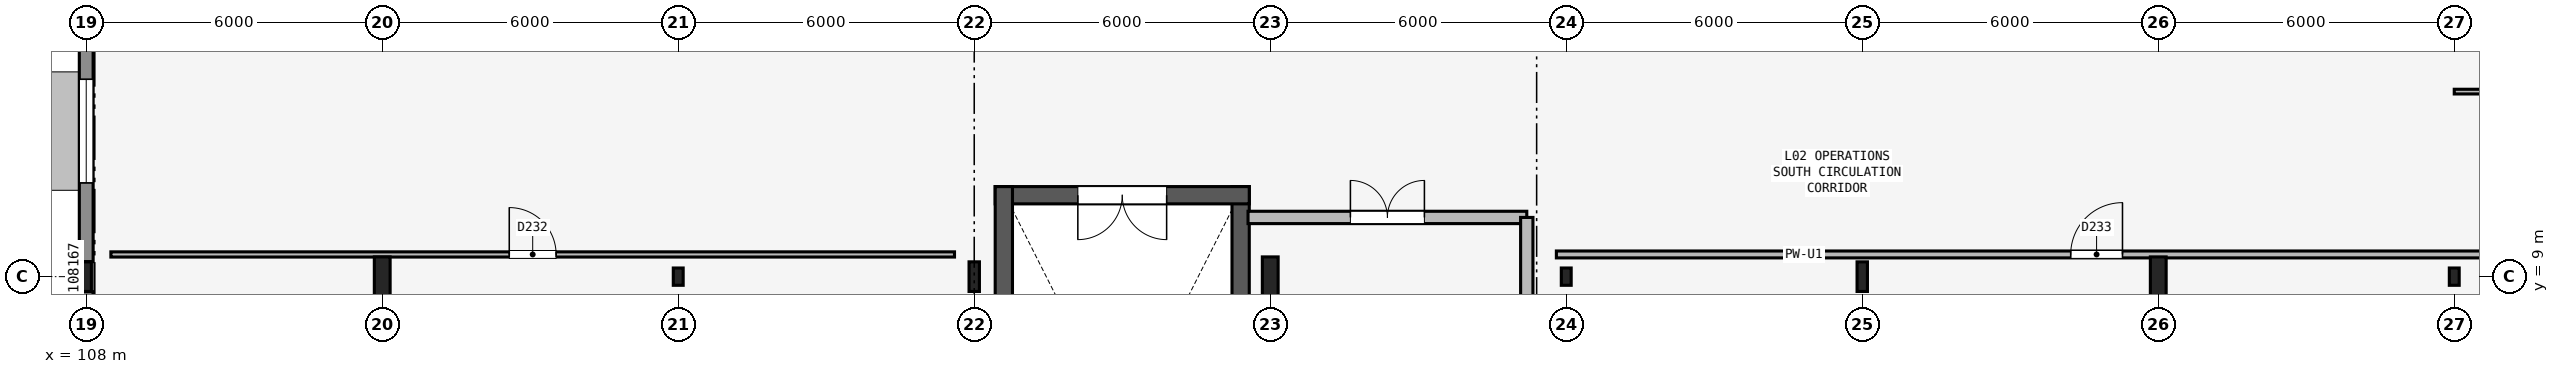
"""IFC4 building model, lengths in metres.
Left out: names, types, materials, properties, quantities, classifications, styles, units other than length and angle.
Written with IfcOpenShell. Run it as: python <this file> out.ifc"""

import sys

from ifc_helpers import new_model, si_unit, direction, frame, frame_2d, origin, origin_2d, place, context, subcontext, project, spatial, rectangle, hollow_rectangle, i_section, extrude, element, fill, save


model = new_model("IFC4")
c1 = context("Model", 3, precision=1e-05, world=origin(), true_north=direction((0.0, 1.0)))
c2 = subcontext(c1, "Body", "Model", "MODEL_VIEW")
j1 = project(units=[si_unit("LENGTHUNIT", "METRE"), si_unit("PLANEANGLEUNIT", "RADIAN")], contexts=[c1])
p1 = place(None, origin())
s1 = spatial("IfcSite", under=j1, at=p1, CompositionType="ELEMENT")
p2 = place(p1, origin())
s2 = spatial("IfcBuilding", under=s1, at=p2, CompositionType="ELEMENT")
p3 = place(p2, frame((0.0, 0.0, 9.3)))
s3 = spatial("IfcBuildingStorey", under=s2, at=p3, CompositionType="ELEMENT", Elevation=9.3)
p4 = place(p3, frame((108.0, 9.0, 0.0), z_axis=(0.0, 0.0, 1.0), x_axis=(1.0, 0.0, 0.0)))
e1 = element("IfcColumn", 1, at=p4, inside=s3, PredefinedType="COLUMN", context=c2, shape_type="SweptSolid", body=[
    extrude(i_section(OverallWidth=0.21, OverallDepth=0.6, WebThickness=0.012, FlangeThickness=0.021, FilletRadius=0.02, at=origin_2d()), origin(), (0.0, 0.0, 1.0), 4.2),
])
p5 = place(p3, frame((114.0, 9.0, 0.0), z_axis=(0.0, 0.0, 1.0), x_axis=(1.0, 0.0, 0.0)))
e2 = element("IfcColumn", 2, at=p5, inside=s3, PredefinedType="COLUMN", context=c2, shape_type="SweptSolid", body=[
    extrude(i_section(OverallWidth=0.32, OverallDepth=0.8, WebThickness=0.016, FlangeThickness=0.028, at=origin_2d()), origin(), (0.0, 0.0, 1.0), 4.2),
])
p6 = place(p3, frame((120.0, 9.0, 0.0), z_axis=(0.0, 0.0, 1.0), x_axis=(1.0, 0.0, 0.0)))
e3 = element("IfcColumn", 3, at=p6, inside=s3, PredefinedType="COLUMN", context=c2, shape_type="SweptSolid", body=[
    extrude(hollow_rectangle(XDim=0.2, YDim=0.35, WallThickness=0.012, InnerFilletRadius=0.012, OuterFilletRadius=0.024, at=origin_2d()), origin(), (0.0, 0.0, 1.0), 4.2),
])
p7 = place(p3, frame((126.0, 9.0, 0.0), z_axis=(0.0, 0.0, 1.0), x_axis=(1.0, 0.0, 0.0)))
e4 = element("IfcColumn", 4, at=p7, inside=s3, PredefinedType="COLUMN", context=c2, shape_type="SweptSolid", body=[
    extrude(i_section(OverallWidth=0.21, OverallDepth=0.6, WebThickness=0.012, FlangeThickness=0.021, FilletRadius=0.02, at=origin_2d()), origin(), (0.0, 0.0, 1.0), 4.2),
])
p8 = place(p3, frame((132.0, 9.0, 0.0), z_axis=(0.0, 0.0, 1.0), x_axis=(1.0, 0.0, 0.0)))
e5 = element("IfcColumn", 5, at=p8, inside=s3, PredefinedType="COLUMN", context=c2, shape_type="SweptSolid", body=[
    extrude(i_section(OverallWidth=0.32, OverallDepth=0.8, WebThickness=0.016, FlangeThickness=0.028, at=origin_2d()), origin(), (0.0, 0.0, 1.0), 4.2),
])
p9 = place(p3, frame((138.0, 9.0, 0.0), z_axis=(0.0, 0.0, 1.0), x_axis=(1.0, 0.0, 0.0)))
e6 = element("IfcColumn", 6, at=p9, inside=s3, PredefinedType="COLUMN", context=c2, shape_type="SweptSolid", body=[
    extrude(hollow_rectangle(XDim=0.2, YDim=0.35, WallThickness=0.012, InnerFilletRadius=0.012, OuterFilletRadius=0.024, at=origin_2d()), origin(), (0.0, 0.0, 1.0), 4.2),
])
p10 = place(p3, frame((144.0, 9.0, 0.0), z_axis=(0.0, 0.0, 1.0), x_axis=(1.0, 0.0, 0.0)))
e7 = element("IfcColumn", 7, at=p10, inside=s3, PredefinedType="COLUMN", context=c2, shape_type="SweptSolid", body=[
    extrude(i_section(OverallWidth=0.21, OverallDepth=0.6, WebThickness=0.012, FlangeThickness=0.021, FilletRadius=0.02, at=origin_2d()), origin(), (0.0, 0.0, 1.0), 4.2),
])
p11 = place(p3, frame((150.0, 9.0, 0.0), z_axis=(0.0, 0.0, 1.0), x_axis=(1.0, 0.0, 0.0)))
e8 = element("IfcColumn", 8, at=p11, inside=s3, PredefinedType="COLUMN", context=c2, shape_type="SweptSolid", body=[
    extrude(i_section(OverallWidth=0.32, OverallDepth=0.8, WebThickness=0.016, FlangeThickness=0.028, at=origin_2d()), origin(), (0.0, 0.0, 1.0), 4.2),
])
p12 = place(p3, frame((156.0, 9.0, 0.0), z_axis=(0.0, 0.0, 1.0), x_axis=(1.0, 0.0, 0.0)))
e9 = element("IfcColumn", 9, at=p12, inside=s3, PredefinedType="COLUMN", context=c2, shape_type="SweptSolid", body=[
    extrude(hollow_rectangle(XDim=0.2, YDim=0.35, WallThickness=0.012, InnerFilletRadius=0.012, OuterFilletRadius=0.024, at=origin_2d()), origin(), (0.0, 0.0, 1.0), 4.2),
])
p13 = place(p3, frame((108.0, 6.8, 0.0), z_axis=(0.0, 0.0, 1.0), x_axis=(0.0, 1.0, 0.0)))
e10 = element("IfcWall", 10, at=p13, inside=s3, PredefinedType="SOLIDWALL", context=c2, shape_type="SweptSolid", body=[
    extrude(rectangle(XDim=1.896, YDim=0.28, at=frame_2d((0.948, 0.0))), origin(), (0.0, 0.0, 1.0), 3.566),
])
p14 = place(p3, frame((108.0, 9.304, 0.0), z_axis=(0.0, 0.0, 1.0), x_axis=(0.0, 1.0, 0.0)))
e11 = element("IfcWall", 11, at=p14, inside=s3, PredefinedType="SOLIDWALL", context=c2, shape_type="SweptSolid", body=[
    extrude(rectangle(XDim=5.292, YDim=0.28, at=frame_2d((2.646, 0.0))), origin(), (0.0, 0.0, 1.0), 3.566),
])
p15 = place(p14, frame((1.596, 0.0, 0.9)))
e12 = element("IfcOpeningElement", 12, at=p15, cuts=e11, PredefinedType="OPENING", context=c2, shape_type="SweptSolid", body=[
    extrude(rectangle(XDim=2.1, YDim=1.5, at=frame_2d((1.05, 0.75))), frame((0.0, 0.15, 0.0), z_axis=(0.0, -1.0, 0.0), x_axis=(1.0, 0.0, 0.0)), (0.0, 0.0, 1.0), 0.3),
])
p16 = place(p3, frame((131.4, 1.075, 0.0), z_axis=(0.0, 0.0, 1.0), x_axis=(0.0, 1.0, 0.0)))
e13 = element("IfcWall", 13, at=p16, inside=s3, PredefinedType="SHEAR", context=c2, shape_type="SweptSolid", body=[
    extrude(rectangle(XDim=9.75, YDim=0.35, at=frame_2d((4.875, 0.0))), origin(), (0.0, 0.0, 1.0), 4.06),
])
p17 = place(p3, frame((131.575, 10.65, 0.0), z_axis=(0.0, 0.0, 1.0), x_axis=(-1.0, 0.0, 0.0)))
e14 = element("IfcWall", 14, at=p17, inside=s3, PredefinedType="SHEAR", context=c2, shape_type="SweptSolid", body=[
    extrude(rectangle(XDim=5.15, YDim=0.35, at=frame_2d((2.575, 0.0))), origin(), (0.0, 0.0, 1.0), 4.06),
])
p18 = place(p17, frame((1.675, 0.0, 0.0)))
e15 = element("IfcOpeningElement", 15, at=p18, cuts=e14, PredefinedType="OPENING", context=c2, shape_type="SweptSolid", body=[
    extrude(rectangle(XDim=1.8, YDim=2.2, at=frame_2d((0.9, 1.1))), frame((0.0, 0.185, 0.0), z_axis=(0.0, -1.0, 0.0), x_axis=(1.0, 0.0, 0.0)), (0.0, 0.0, 1.0), 0.37),
])
p19 = place(p3, frame((126.6, 10.825, 0.0), z_axis=(0.0, 0.0, 1.0), x_axis=(0.0, -1.0, 0.0)))
e16 = element("IfcWall", 16, at=p19, inside=s3, PredefinedType="SHEAR", context=c2, shape_type="SweptSolid", body=[
    extrude(rectangle(XDim=9.75, YDim=0.35, at=frame_2d((4.875, 0.0))), origin(), (0.0, 0.0, 1.0), 4.06),
])
p20 = place(p3, frame((131.55, 10.2, 0.0), z_axis=(0.0, 0.0, 1.0), x_axis=(1.0, 0.0, 0.0)))
e17 = element("IfcWall", 17, at=p20, inside=s3, PredefinedType="PARTITIONING", context=c2, shape_type="SweptSolid", body=[
    extrude(rectangle(XDim=5.65, YDim=0.25, at=frame_2d((2.825, 0.0))), origin(), (0.0, 0.0, 1.0), 3.566),
])
p21 = place(p20, frame((2.075, 0.0, 0.0)))
e18 = element("IfcOpeningElement", 18, at=p21, cuts=e17, PredefinedType="OPENING", context=c2, shape_type="SweptSolid", body=[
    extrude(rectangle(XDim=1.5, YDim=2.15, at=frame_2d((0.75, 1.075))), frame((0.0, 0.135, 0.0), z_axis=(0.0, -1.0, 0.0), x_axis=(1.0, 0.0, 0.0)), (0.0, 0.0, 1.0), 0.27),
])
p22 = place(p3, frame((137.2, 5.8, 0.0), z_axis=(0.0, 0.0, 1.0), x_axis=(0.0, 1.0, 0.0)))
e19 = element("IfcWall", 19, at=p22, inside=s3, PredefinedType="PARTITIONING", context=c2, shape_type="SweptSolid", body=[
    extrude(rectangle(XDim=4.4, YDim=0.25, at=frame_2d((2.2, 0.0))), origin(), (0.0, 0.0, 1.0), 3.39),
])
p23 = place(p3, frame((108.5, 9.45, 0.0), z_axis=(0.0, 0.0, 1.0), x_axis=(1.0, 0.0, 0.0)))
e20 = element("IfcWall", 20, at=p23, inside=s3, PredefinedType="PARTITIONING", context=c2, shape_type="SweptSolid", body=[
    extrude(rectangle(XDim=17.1, YDim=0.105, at=frame_2d((8.55, 0.0))), origin(), (0.0, 0.0, 1.0), 3.49),
])
p24 = place(p23, frame((8.075, 0.0, 0.0)))
e21 = element("IfcOpeningElement", 21, at=p24, cuts=e20, PredefinedType="OPENING", context=c2, shape_type="SweptSolid", body=[
    extrude(rectangle(XDim=0.95, YDim=2.15, at=frame_2d((0.475, 1.075))), frame((0.0, 0.062, 0.0), z_axis=(0.0, -1.0, 0.0), x_axis=(1.0, 0.0, 0.0)), (0.0, 0.0, 1.0), 0.125),
])
p25 = place(p3, frame((137.8, 9.45, 0.0), z_axis=(0.0, 0.0, 1.0), x_axis=(1.0, 0.0, 0.0)))
e22 = element("IfcWall", 22, at=p25, inside=s3, PredefinedType="PARTITIONING", context=c2, shape_type="SweptSolid", body=[
    extrude(rectangle(XDim=22.8, YDim=0.14, at=frame_2d((11.4, 0.0))), origin(), (0.0, 0.0, 1.0), 3.49),
])
p26 = place(p25, frame((10.425, 0.0, 0.0)))
e23 = element("IfcOpeningElement", 23, at=p26, cuts=e22, PredefinedType="OPENING", context=c2, shape_type="SweptSolid", body=[
    extrude(rectangle(XDim=1.05, YDim=2.2, at=frame_2d((0.525, 1.1))), frame((0.0, 0.08, 0.0), z_axis=(0.0, -1.0, 0.0), x_axis=(1.0, 0.0, 0.0)), (0.0, 0.0, 1.0), 0.16),
])
p27 = place(p3, frame((160.6, 12.75, 0.0), z_axis=(0.0, 0.0, 1.0), x_axis=(-1.0, 0.0, 0.0)))
e24 = element("IfcWall", 24, at=p27, inside=s3, PredefinedType="PARTITIONING", context=c2, shape_type="SweptSolid", body=[
    extrude(rectangle(XDim=4.6, YDim=0.095, at=frame_2d((2.3, 0.0))), origin(), (0.0, 0.0, 1.0), 3.566),
])
p28 = place(p27, frame((1.525, 0.0, 0.0)))
e25 = element("IfcOpeningElement", 25, at=p28, cuts=e24, PredefinedType="OPENING", context=c2, shape_type="SweptSolid", body=[
    extrude(rectangle(XDim=1.55, YDim=2.2, at=frame_2d((0.775, 1.1))), frame((0.0, 0.057, 0.0), z_axis=(0.0, -1.0, 0.0), x_axis=(1.0, 0.0, 0.0)), (0.0, 0.0, 1.0), 0.115),
])
p29 = place(p15, origin())
e26 = element("IfcWindow", 26, at=p29, inside=s3, PartitioningType="SINGLE_PANEL", PredefinedType="WINDOW", context=c2, shape_type="SweptSolid", body=[
    extrude(rectangle(XDim=2.1, YDim=1.5, at=frame_2d((1.05, 0.75))), frame((0.0, 0.03, 0.0), z_axis=(0.0, -1.0, 0.0), x_axis=(1.0, 0.0, 0.0)), (0.0, 0.0, 1.0), 0.06),
])
fill(e12, e26)
p30 = place(p18, origin())
e27 = element("IfcDoor", 27, at=p30, inside=s3, OperationType="DOUBLE_DOOR_SINGLE_SWING", PredefinedType="DOOR", context=c2, shape_type="SweptSolid", body=[
    extrude(rectangle(XDim=1.8, YDim=2.2, at=frame_2d((0.9, 1.1))), frame((0.0, 0.025, 0.0), z_axis=(0.0, -1.0, 0.0), x_axis=(1.0, 0.0, 0.0)), (0.0, 0.0, 1.0), 0.05),
])
fill(e15, e27)
p31 = place(p21, origin())
e28 = element("IfcDoor", 28, at=p31, inside=s3, OperationType="DOUBLE_DOOR_SINGLE_SWING", PredefinedType="DOOR", context=c2, shape_type="SweptSolid", body=[
    extrude(rectangle(XDim=1.5, YDim=2.15, at=frame_2d((0.75, 1.075))), frame((0.0, 0.025, 0.0), z_axis=(0.0, -1.0, 0.0), x_axis=(1.0, 0.0, 0.0)), (0.0, 0.0, 1.0), 0.05),
])
fill(e18, e28)
p32 = place(p24, origin())
e29 = element("IfcDoor", 29, at=p32, inside=s3, OperationType="SINGLE_SWING_LEFT", PredefinedType="DOOR", context=c2, shape_type="SweptSolid", body=[
    extrude(rectangle(XDim=0.95, YDim=2.15, at=frame_2d((0.475, 1.075))), frame((0.0, 0.025, 0.0), z_axis=(0.0, -1.0, 0.0), x_axis=(1.0, 0.0, 0.0)), (0.0, 0.0, 1.0), 0.05),
])
fill(e21, e29)
p33 = place(p26, origin())
e30 = element("IfcDoor", 30, at=p33, inside=s3, OperationType="SINGLE_SWING_RIGHT", PredefinedType="DOOR", context=c2, shape_type="SweptSolid", body=[
    extrude(rectangle(XDim=1.05, YDim=2.2, at=frame_2d((0.525, 1.1))), frame((0.0, 0.025, 0.0), z_axis=(0.0, -1.0, 0.0), x_axis=(1.0, 0.0, 0.0)), (0.0, 0.0, 1.0), 0.05),
])
fill(e23, e30)
save(model, sys.argv[1])
